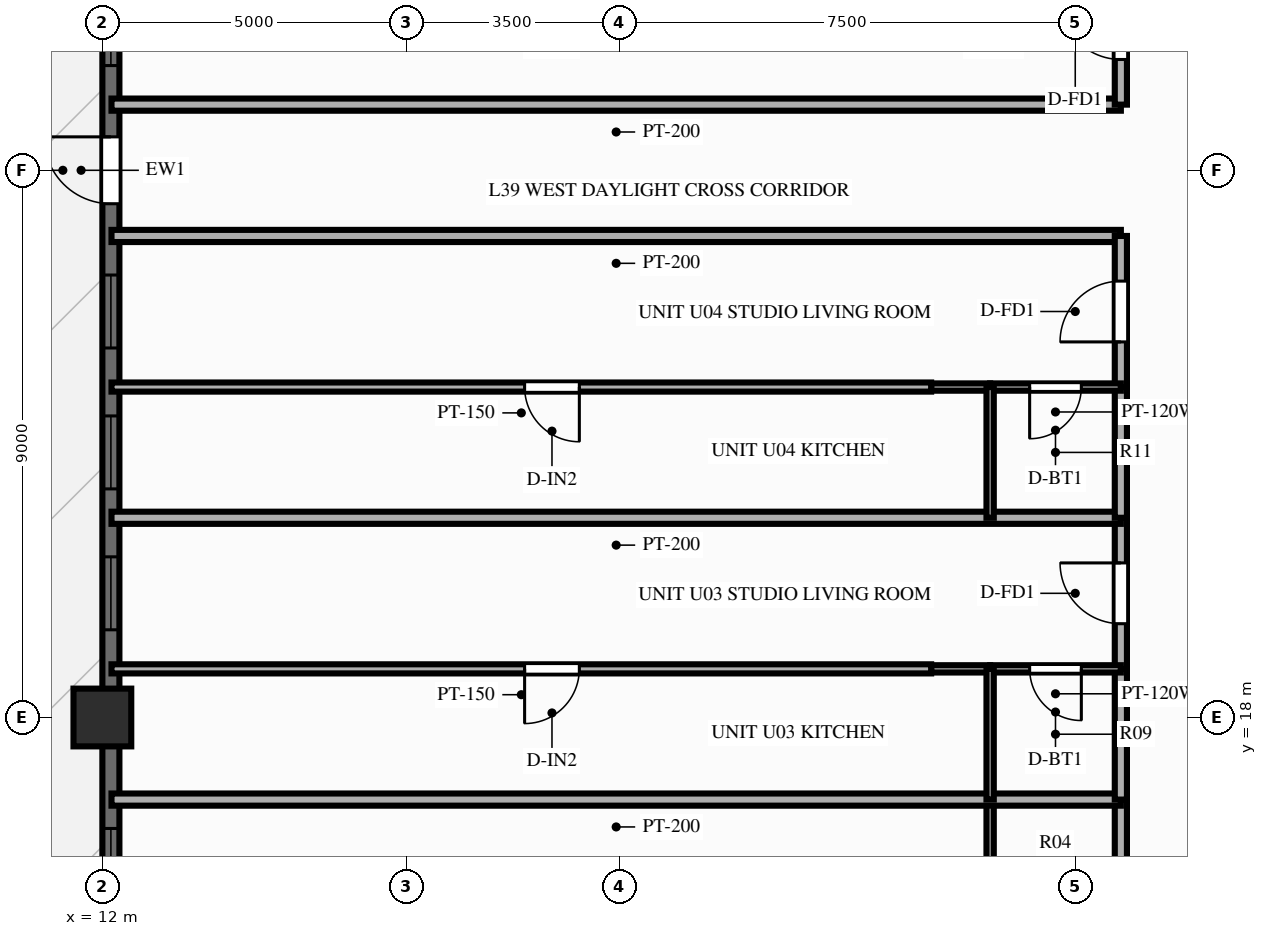
"""IFC4 building model, lengths in metres.
Left out: names, types, materials, properties, quantities, classifications, styles, units other than length and angle.
Written with IfcOpenShell. Run it as: python <this file> out.ifc"""

import sys

from ifc_helpers import new_model, si_unit, direction, frame, frame_2d, origin, origin_2d, place, context, subcontext, project, spatial, rectangle, extrude, source, transform, mapped, element, fill, save


model = new_model("IFC4")
c1 = context("Model", 3, precision=1e-05, world=origin(), true_north=direction((0.0, 1.0)))
c2 = subcontext(c1, "Body", "Model", "MODEL_VIEW")
j1 = project(units=[si_unit("LENGTHUNIT", "METRE"), si_unit("PLANEANGLEUNIT", "RADIAN")], contexts=[c1])
p1 = place(None, origin())
s1 = spatial("IfcSite", under=j1, at=p1, CompositionType="ELEMENT")
p2 = place(p1, origin())
s2 = spatial("IfcBuilding", under=s1, at=p2, CompositionType="ELEMENT")
p3 = place(p2, frame((0.0, 0.0, 122.85)))
s3 = spatial("IfcBuildingStorey", under=s2, at=p3, CompositionType="ELEMENT", Elevation=122.85)
m1 = source(origin(), c2, "Body", "SweptSolid", [
    extrude(rectangle(XDim=0.95, YDim=0.95, at=origin_2d()), origin(), (0.0, 0.0, 1.0), 3.9),
])
p4 = place(p3, frame((12.0, 18.0, 0.0), z_axis=(0.0, 0.0, 1.0), x_axis=(1.0, 0.0, 0.0)))
e1 = element("IfcColumn", 1, at=p4, inside=s3, PredefinedType="COLUMN", context=c2, shape_type="MappedRepresentation", body=[
    mapped(m1, transform((0.0, 0.0, 0.0), scale=1.0)),
])
p5 = place(p3, frame((12.14, 7.2, 0.0), z_axis=(0.0, 0.0, 1.0), x_axis=(0.0, 1.0, 0.0)))
e2 = element("IfcWall", 2, at=p5, inside=s3, PredefinedType="SOLIDWALL", context=c2, shape_type="SweptSolid", body=[
    extrude(rectangle(XDim=39.6, YDim=0.28, at=frame_2d((19.8, 0.0))), origin(), (0.0, 0.0, 1.0), 2.24),
])
p6 = place(p5, frame((0.89, 0.0, 0.25)))
e3 = element("IfcOpeningElement", 3, at=p6, cuts=e2, PredefinedType="OPENING", context=c2, shape_type="SweptSolid", body=[
    extrude(rectangle(XDim=1.2, YDim=1.5, at=frame_2d((0.6, 0.75))), frame((0.0, 0.152, 0.0), z_axis=(0.0, -1.0, 0.0), x_axis=(1.0, 0.0, 0.0)), (0.0, 0.0, 1.0), 0.304),
])
p7 = place(p5, frame((3.14, 0.0, 0.25)))
e4 = element("IfcOpeningElement", 4, at=p7, cuts=e2, PredefinedType="OPENING", context=c2, shape_type="SweptSolid", body=[
    extrude(rectangle(XDim=1.2, YDim=1.5, at=frame_2d((0.6, 0.75))), frame((0.0, 0.152, 0.0), z_axis=(0.0, -1.0, 0.0), x_axis=(1.0, 0.0, 0.0)), (0.0, 0.0, 1.0), 0.304),
])
p8 = place(p5, frame((5.458, 0.0, 0.25)))
e5 = element("IfcOpeningElement", 5, at=p8, cuts=e2, PredefinedType="OPENING", context=c2, shape_type="SweptSolid", body=[
    extrude(rectangle(XDim=1.2, YDim=1.5, at=frame_2d((0.6, 0.75))), frame((0.0, 0.152, 0.0), z_axis=(0.0, -1.0, 0.0), x_axis=(1.0, 0.0, 0.0)), (0.0, 0.0, 1.0), 0.304),
])
p9 = place(p5, frame((7.775, 0.0, 0.25)))
e6 = element("IfcOpeningElement", 6, at=p9, cuts=e2, PredefinedType="OPENING", context=c2, shape_type="SweptSolid", body=[
    extrude(rectangle(XDim=1.2, YDim=1.5, at=frame_2d((0.6, 0.75))), frame((0.0, 0.152, 0.0), z_axis=(0.0, -1.0, 0.0), x_axis=(1.0, 0.0, 0.0)), (0.0, 0.0, 1.0), 0.304),
])
p10 = place(p5, frame((12.242, 0.0, 0.25)))
e7 = element("IfcOpeningElement", 7, at=p10, cuts=e2, PredefinedType="OPENING", context=c2, shape_type="SweptSolid", body=[
    extrude(rectangle(XDim=1.2, YDim=1.5, at=frame_2d((0.6, 0.75))), frame((0.0, 0.152, 0.0), z_axis=(0.0, -1.0, 0.0), x_axis=(1.0, 0.0, 0.0)), (0.0, 0.0, 1.0), 0.304),
])
p11 = place(p5, frame((14.56, 0.0, 0.25)))
e8 = element("IfcOpeningElement", 8, at=p11, cuts=e2, PredefinedType="OPENING", context=c2, shape_type="SweptSolid", body=[
    extrude(rectangle(XDim=1.2, YDim=1.5, at=frame_2d((0.6, 0.75))), frame((0.0, 0.152, 0.0), z_axis=(0.0, -1.0, 0.0), x_axis=(1.0, 0.0, 0.0)), (0.0, 0.0, 1.0), 0.304),
])
p12 = place(p5, frame((16.877, 0.0, 0.25)))
e9 = element("IfcOpeningElement", 9, at=p12, cuts=e2, PredefinedType="OPENING", context=c2, shape_type="SweptSolid", body=[
    extrude(rectangle(XDim=1.2, YDim=1.5, at=frame_2d((0.6, 0.75))), frame((0.0, 0.152, 0.0), z_axis=(0.0, -1.0, 0.0), x_axis=(1.0, 0.0, 0.0)), (0.0, 0.0, 1.0), 0.304),
])
p13 = place(p5, frame((19.25, 0.0, 0.0)))
e10 = element("IfcOpeningElement", 10, at=p13, cuts=e2, PredefinedType="OPENING", context=c2, shape_type="SweptSolid", body=[
    extrude(rectangle(XDim=1.1, YDim=2.15, at=frame_2d((0.55, 1.075))), frame((0.0, 0.152, 0.0), z_axis=(0.0, -1.0, 0.0), x_axis=(1.0, 0.0, 0.0)), (0.0, 0.0, 1.0), 0.304),
])
p14 = place(p5, frame((21.522, 0.0, 0.25)))
e11 = element("IfcOpeningElement", 11, at=p14, cuts=e2, PredefinedType="OPENING", context=c2, shape_type="SweptSolid", body=[
    extrude(rectangle(XDim=1.2, YDim=1.5, at=frame_2d((0.6, 0.75))), frame((0.0, 0.152, 0.0), z_axis=(0.0, -1.0, 0.0), x_axis=(1.0, 0.0, 0.0)), (0.0, 0.0, 1.0), 0.304),
])
p15 = place(p5, frame((23.84, 0.0, 0.25)))
e12 = element("IfcOpeningElement", 12, at=p15, cuts=e2, PredefinedType="OPENING", context=c2, shape_type="SweptSolid", body=[
    extrude(rectangle(XDim=1.2, YDim=1.5, at=frame_2d((0.6, 0.75))), frame((0.0, 0.152, 0.0), z_axis=(0.0, -1.0, 0.0), x_axis=(1.0, 0.0, 0.0)), (0.0, 0.0, 1.0), 0.304),
])
p16 = place(p5, frame((26.157, 0.0, 0.25)))
e13 = element("IfcOpeningElement", 13, at=p16, cuts=e2, PredefinedType="OPENING", context=c2, shape_type="SweptSolid", body=[
    extrude(rectangle(XDim=1.2, YDim=1.5, at=frame_2d((0.6, 0.75))), frame((0.0, 0.152, 0.0), z_axis=(0.0, -1.0, 0.0), x_axis=(1.0, 0.0, 0.0)), (0.0, 0.0, 1.0), 0.304),
])
p17 = place(p5, frame((30.625, 0.0, 0.25)))
e14 = element("IfcOpeningElement", 14, at=p17, cuts=e2, PredefinedType="OPENING", context=c2, shape_type="SweptSolid", body=[
    extrude(rectangle(XDim=1.2, YDim=1.5, at=frame_2d((0.6, 0.75))), frame((0.0, 0.152, 0.0), z_axis=(0.0, -1.0, 0.0), x_axis=(1.0, 0.0, 0.0)), (0.0, 0.0, 1.0), 0.304),
])
p18 = place(p5, frame((32.942, 0.0, 0.25)))
e15 = element("IfcOpeningElement", 15, at=p18, cuts=e2, PredefinedType="OPENING", context=c2, shape_type="SweptSolid", body=[
    extrude(rectangle(XDim=1.2, YDim=1.5, at=frame_2d((0.6, 0.75))), frame((0.0, 0.152, 0.0), z_axis=(0.0, -1.0, 0.0), x_axis=(1.0, 0.0, 0.0)), (0.0, 0.0, 1.0), 0.304),
])
p19 = place(p5, frame((35.26, 0.0, 0.25)))
e16 = element("IfcOpeningElement", 16, at=p19, cuts=e2, PredefinedType="OPENING", context=c2, shape_type="SweptSolid", body=[
    extrude(rectangle(XDim=1.2, YDim=1.5, at=frame_2d((0.6, 0.75))), frame((0.0, 0.152, 0.0), z_axis=(0.0, -1.0, 0.0), x_axis=(1.0, 0.0, 0.0)), (0.0, 0.0, 1.0), 0.304),
])
p20 = place(p5, frame((37.51, 0.0, 0.25)))
e17 = element("IfcOpeningElement", 17, at=p20, cuts=e2, PredefinedType="OPENING", context=c2, shape_type="SweptSolid", body=[
    extrude(rectangle(XDim=1.2, YDim=1.5, at=frame_2d((0.6, 0.75))), frame((0.0, 0.152, 0.0), z_axis=(0.0, -1.0, 0.0), x_axis=(1.0, 0.0, 0.0)), (0.0, 0.0, 1.0), 0.304),
])
p21 = place(p3, frame((28.75, 25.92, 0.0), z_axis=(0.0, 0.0, 1.0), x_axis=(-1.0, 0.0, 0.0)))
e18 = element("IfcWall", 18, at=p21, inside=s3, PredefinedType="PARTITIONING", context=c2, shape_type="SweptSolid", body=[
    extrude(rectangle(XDim=16.6, YDim=0.2, at=frame_2d((8.3, 0.0))), origin(), (0.0, 0.0, 1.0), 3.56),
])
p22 = place(p3, frame((28.75, 14.5, 0.0), z_axis=(0.0, 0.0, 1.0), x_axis=(0.0, 1.0, 0.0)))
e19 = element("IfcWall", 19, at=p22, inside=s3, PredefinedType="PARTITIONING", context=c2, shape_type="SweptSolid", body=[
    extrude(rectangle(XDim=2.15, YDim=0.2, at=frame_2d((1.075, 0.0))), origin(), (0.0, 0.0, 1.0), 3.56),
])
p23 = place(p3, frame((26.6, 14.5, 0.0), z_axis=(0.0, 0.0, 1.0), x_axis=(0.0, 1.0, 0.0)))
e20 = element("IfcWall", 20, at=p23, inside=s3, PredefinedType="PARTITIONING", context=c2, shape_type="SweptSolid", body=[
    extrude(rectangle(XDim=2.15, YDim=0.12, at=frame_2d((1.075, 0.0))), origin(), (0.0, 0.0, 1.0), 3.56),
])
p24 = place(p3, frame((28.75, 16.65, 0.0), z_axis=(0.0, 0.0, 1.0), x_axis=(-1.0, 0.0, 0.0)))
e21 = element("IfcWall", 21, at=p24, inside=s3, PredefinedType="PARTITIONING", context=c2, shape_type="SweptSolid", body=[
    extrude(rectangle(XDim=16.6, YDim=0.2, at=frame_2d((8.3, 0.0))), origin(), (0.0, 0.0, 1.0), 3.56),
])
p25 = place(p3, frame((28.75, 16.65, 0.0), z_axis=(0.0, 0.0, 1.0), x_axis=(0.0, 1.0, 0.0)))
e22 = element("IfcWall", 22, at=p25, inside=s3, PredefinedType="PARTITIONING", context=c2, shape_type="SweptSolid", body=[
    extrude(rectangle(XDim=2.15, YDim=0.2, at=frame_2d((1.075, 0.0))), origin(), (0.0, 0.0, 1.0), 3.56),
])
p26 = place(p3, frame((28.75, 18.8, 0.0), z_axis=(0.0, 0.0, 1.0), x_axis=(0.0, 1.0, 0.0)))
e23 = element("IfcWall", 23, at=p26, inside=s3, PredefinedType="PARTITIONING", context=c2, shape_type="SweptSolid", body=[
    extrude(rectangle(XDim=2.485, YDim=0.2, at=frame_2d((1.242, 0.0))), origin(), (0.0, 0.0, 1.0), 3.56),
])
p27 = place(p26, frame((0.742, 0.0, 0.0)))
e24 = element("IfcOpeningElement", 24, at=p27, cuts=e23, PredefinedType="OPENING", context=c2, shape_type="SweptSolid", body=[
    extrude(rectangle(XDim=1.0, YDim=2.15, at=frame_2d((0.5, 1.075))), frame((0.0, 0.112, 0.0), z_axis=(0.0, -1.0, 0.0), x_axis=(1.0, 0.0, 0.0)), (0.0, 0.0, 1.0), 0.224),
])
p28 = place(p3, frame((28.75, 18.8, 0.0), z_axis=(0.0, 0.0, 1.0), x_axis=(-1.0, 0.0, 0.0)))
e25 = element("IfcWall", 25, at=p28, inside=s3, PredefinedType="PARTITIONING", context=c2, shape_type="SweptSolid", body=[
    extrude(rectangle(XDim=2.15, YDim=0.12, at=frame_2d((1.075, 0.0))), origin(), (0.0, 0.0, 1.0), 3.56),
])
p29 = place(p28, frame((0.65, 0.0, 0.0)))
e26 = element("IfcOpeningElement", 26, at=p29, cuts=e25, PredefinedType="OPENING", context=c2, shape_type="SweptSolid", body=[
    extrude(rectangle(XDim=0.85, YDim=2.05, at=frame_2d((0.425, 1.025))), frame((0.0, 0.072, 0.0), z_axis=(0.0, -1.0, 0.0), x_axis=(1.0, 0.0, 0.0)), (0.0, 0.0, 1.0), 0.144),
])
p30 = place(p3, frame((26.6, 18.8, 0.0), z_axis=(0.0, 0.0, 1.0), x_axis=(-1.0, 0.0, 0.0)))
e27 = element("IfcWall", 27, at=p30, inside=s3, PredefinedType="PARTITIONING", context=c2, shape_type="SweptSolid", body=[
    extrude(rectangle(XDim=0.97, YDim=0.12, at=frame_2d((0.485, 0.0))), origin(), (0.0, 0.0, 1.0), 3.56),
])
p31 = place(p3, frame((26.6, 16.65, 0.0), z_axis=(0.0, 0.0, 1.0), x_axis=(0.0, 1.0, 0.0)))
e28 = element("IfcWall", 28, at=p31, inside=s3, PredefinedType="PARTITIONING", context=c2, shape_type="SweptSolid", body=[
    extrude(rectangle(XDim=2.15, YDim=0.12, at=frame_2d((1.075, 0.0))), origin(), (0.0, 0.0, 1.0), 3.56),
])
p32 = place(p3, frame((25.63, 18.8, 0.0), z_axis=(0.0, 0.0, 1.0), x_axis=(-1.0, 0.0, 0.0)))
e29 = element("IfcWall", 29, at=p32, inside=s3, PredefinedType="PARTITIONING", context=c2, shape_type="SweptSolid", body=[
    extrude(rectangle(XDim=13.48, YDim=0.15, at=frame_2d((6.74, 0.0))), origin(), (0.0, 0.0, 1.0), 3.56),
])
p33 = place(p32, frame((5.786, 0.0, 0.0)))
e30 = element("IfcOpeningElement", 30, at=p33, cuts=e29, PredefinedType="OPENING", context=c2, shape_type="SweptSolid", body=[
    extrude(rectangle(XDim=0.9, YDim=2.1, at=frame_2d((0.45, 1.05))), frame((0.0, 0.087, 0.0), z_axis=(0.0, -1.0, 0.0), x_axis=(1.0, 0.0, 0.0)), (0.0, 0.0, 1.0), 0.174),
])
p34 = place(p3, frame((28.75, 21.285, 0.0), z_axis=(0.0, 0.0, 1.0), x_axis=(-1.0, 0.0, 0.0)))
e31 = element("IfcWall", 31, at=p34, inside=s3, PredefinedType="PARTITIONING", context=c2, shape_type="SweptSolid", body=[
    extrude(rectangle(XDim=16.6, YDim=0.2, at=frame_2d((8.3, 0.0))), origin(), (0.0, 0.0, 1.0), 3.56),
])
p35 = place(p3, frame((28.75, 21.285, 0.0), z_axis=(0.0, 0.0, 1.0), x_axis=(0.0, 1.0, 0.0)))
e32 = element("IfcWall", 32, at=p35, inside=s3, PredefinedType="PARTITIONING", context=c2, shape_type="SweptSolid", body=[
    extrude(rectangle(XDim=2.15, YDim=0.2, at=frame_2d((1.075, 0.0))), origin(), (0.0, 0.0, 1.0), 3.56),
])
p36 = place(p3, frame((28.75, 23.435, 0.0), z_axis=(0.0, 0.0, 1.0), x_axis=(0.0, 1.0, 0.0)))
e33 = element("IfcWall", 33, at=p36, inside=s3, PredefinedType="PARTITIONING", context=c2, shape_type="SweptSolid", body=[
    extrude(rectangle(XDim=2.485, YDim=0.2, at=frame_2d((1.242, 0.0))), origin(), (0.0, 0.0, 1.0), 3.56),
])
p37 = place(p36, frame((0.742, 0.0, 0.0)))
e34 = element("IfcOpeningElement", 34, at=p37, cuts=e33, PredefinedType="OPENING", context=c2, shape_type="SweptSolid", body=[
    extrude(rectangle(XDim=1.0, YDim=2.15, at=frame_2d((0.5, 1.075))), frame((0.0, 0.112, 0.0), z_axis=(0.0, -1.0, 0.0), x_axis=(1.0, 0.0, 0.0)), (0.0, 0.0, 1.0), 0.224),
])
p38 = place(p3, frame((28.75, 23.435, 0.0), z_axis=(0.0, 0.0, 1.0), x_axis=(-1.0, 0.0, 0.0)))
e35 = element("IfcWall", 35, at=p38, inside=s3, PredefinedType="PARTITIONING", context=c2, shape_type="SweptSolid", body=[
    extrude(rectangle(XDim=2.15, YDim=0.12, at=frame_2d((1.075, 0.0))), origin(), (0.0, 0.0, 1.0), 3.56),
])
p39 = place(p38, frame((0.65, 0.0, 0.0)))
e36 = element("IfcOpeningElement", 36, at=p39, cuts=e35, PredefinedType="OPENING", context=c2, shape_type="SweptSolid", body=[
    extrude(rectangle(XDim=0.85, YDim=2.05, at=frame_2d((0.425, 1.025))), frame((0.0, 0.072, 0.0), z_axis=(0.0, -1.0, 0.0), x_axis=(1.0, 0.0, 0.0)), (0.0, 0.0, 1.0), 0.144),
])
p40 = place(p3, frame((26.6, 23.435, 0.0), z_axis=(0.0, 0.0, 1.0), x_axis=(-1.0, 0.0, 0.0)))
e37 = element("IfcWall", 37, at=p40, inside=s3, PredefinedType="PARTITIONING", context=c2, shape_type="SweptSolid", body=[
    extrude(rectangle(XDim=0.97, YDim=0.12, at=frame_2d((0.485, 0.0))), origin(), (0.0, 0.0, 1.0), 3.56),
])
p41 = place(p3, frame((26.6, 21.285, 0.0), z_axis=(0.0, 0.0, 1.0), x_axis=(0.0, 1.0, 0.0)))
e38 = element("IfcWall", 38, at=p41, inside=s3, PredefinedType="PARTITIONING", context=c2, shape_type="SweptSolid", body=[
    extrude(rectangle(XDim=2.15, YDim=0.12, at=frame_2d((1.075, 0.0))), origin(), (0.0, 0.0, 1.0), 3.56),
])
p42 = place(p3, frame((25.63, 23.435, 0.0), z_axis=(0.0, 0.0, 1.0), x_axis=(-1.0, 0.0, 0.0)))
e39 = element("IfcWall", 39, at=p42, inside=s3, PredefinedType="PARTITIONING", context=c2, shape_type="SweptSolid", body=[
    extrude(rectangle(XDim=13.48, YDim=0.15, at=frame_2d((6.74, 0.0))), origin(), (0.0, 0.0, 1.0), 3.56),
])
p43 = place(p42, frame((5.786, 0.0, 0.0)))
e40 = element("IfcOpeningElement", 40, at=p43, cuts=e39, PredefinedType="OPENING", context=c2, shape_type="SweptSolid", body=[
    extrude(rectangle(XDim=0.9, YDim=2.1, at=frame_2d((0.45, 1.05))), frame((0.0, 0.087, 0.0), z_axis=(0.0, -1.0, 0.0), x_axis=(1.0, 0.0, 0.0)), (0.0, 0.0, 1.0), 0.174),
])
p44 = place(p3, frame((28.75, 28.08, 0.0), z_axis=(0.0, 0.0, 1.0), x_axis=(-1.0, 0.0, 0.0)))
e41 = element("IfcWall", 41, at=p44, inside=s3, PredefinedType="PARTITIONING", context=c2, shape_type="SweptSolid", body=[
    extrude(rectangle(XDim=16.6, YDim=0.2, at=frame_2d((8.3, 0.0))), origin(), (0.0, 0.0, 1.0), 3.56),
])
p45 = place(p3, frame((28.75, 28.08, 0.0), z_axis=(0.0, 0.0, 1.0), x_axis=(0.0, 1.0, 0.0)))
e42 = element("IfcWall", 42, at=p45, inside=s3, PredefinedType="PARTITIONING", context=c2, shape_type="SweptSolid", body=[
    extrude(rectangle(XDim=2.485, YDim=0.2, at=frame_2d((1.242, 0.0))), origin(), (0.0, 0.0, 1.0), 3.56),
])
p46 = place(p45, frame((0.742, 0.0, 0.0)))
e43 = element("IfcOpeningElement", 43, at=p46, cuts=e42, PredefinedType="OPENING", context=c2, shape_type="SweptSolid", body=[
    extrude(rectangle(XDim=1.0, YDim=2.15, at=frame_2d((0.5, 1.075))), frame((0.0, 0.112, 0.0), z_axis=(0.0, -1.0, 0.0), x_axis=(1.0, 0.0, 0.0)), (0.0, 0.0, 1.0), 0.224),
])
m2 = source(origin(), c2, "Body", "SweptSolid", [
    extrude(rectangle(XDim=1.2, YDim=1.5, at=frame_2d((0.6, 0.75))), frame((0.0, 0.03, 0.0), z_axis=(0.0, -1.0, 0.0), x_axis=(1.0, 0.0, 0.0)), (0.0, 0.0, 1.0), 0.06),
])
p47 = place(p9, origin())
e44 = element("IfcWindow", 44, at=p47, inside=s3, PartitioningType="SINGLE_PANEL", PredefinedType="WINDOW", context=c2, shape_type="MappedRepresentation", body=[
    mapped(m2, transform((0.0, 0.0, 0.0), scale=1.0)),
])
fill(e6, e44)
p48 = place(p10, origin())
e45 = element("IfcWindow", 45, at=p48, inside=s3, PartitioningType="SINGLE_PANEL", PredefinedType="WINDOW", context=c2, shape_type="MappedRepresentation", body=[
    mapped(m2, transform((0.0, 0.0, 0.0), scale=1.0)),
])
fill(e7, e45)
p49 = place(p11, origin())
e46 = element("IfcWindow", 46, at=p49, inside=s3, PartitioningType="SINGLE_PANEL", PredefinedType="WINDOW", context=c2, shape_type="MappedRepresentation", body=[
    mapped(m2, transform((0.0, 0.0, 0.0), scale=1.0)),
])
fill(e8, e46)
p50 = place(p12, origin())
e47 = element("IfcWindow", 47, at=p50, inside=s3, PartitioningType="SINGLE_PANEL", PredefinedType="WINDOW", context=c2, shape_type="MappedRepresentation", body=[
    mapped(m2, transform((0.0, 0.0, 0.0), scale=1.0)),
])
fill(e9, e47)
m3 = source(origin(), c2, "Body", "SweptSolid", [
    extrude(rectangle(XDim=1.1, YDim=2.15, at=frame_2d((0.55, 1.075))), frame((0.0, 0.025, 0.0), z_axis=(0.0, -1.0, 0.0), x_axis=(1.0, 0.0, 0.0)), (0.0, 0.0, 1.0), 0.05),
])
p51 = place(p13, origin())
e48 = element("IfcDoor", 48, at=p51, inside=s3, OperationType="SINGLE_SWING_RIGHT", PredefinedType="DOOR", context=c2, shape_type="MappedRepresentation", body=[
    mapped(m3, transform((0.0, 0.0, 0.0), scale=1.0)),
])
fill(e10, e48)
p52 = place(p14, origin())
e49 = element("IfcWindow", 49, at=p52, inside=s3, PartitioningType="SINGLE_PANEL", PredefinedType="WINDOW", context=c2, shape_type="MappedRepresentation", body=[
    mapped(m2, transform((0.0, 0.0, 0.0), scale=1.0)),
])
fill(e11, e49)
m4 = source(origin(), c2, "Body", "SweptSolid", [
    extrude(rectangle(XDim=1.0, YDim=2.15, at=frame_2d((0.5, 1.075))), frame((0.0, 0.025, 0.0), z_axis=(0.0, -1.0, 0.0), x_axis=(1.0, 0.0, 0.0)), (0.0, 0.0, 1.0), 0.05),
])
p53 = place(p27, origin())
e50 = element("IfcDoor", 50, at=p53, inside=s3, OperationType="SINGLE_SWING_RIGHT", PredefinedType="DOOR", context=c2, shape_type="MappedRepresentation", body=[
    mapped(m4, transform((0.0, 0.0, 0.0), scale=1.0)),
])
fill(e24, e50)
m5 = source(origin(), c2, "Body", "SweptSolid", [
    extrude(rectangle(XDim=0.85, YDim=2.05, at=frame_2d((0.425, 1.025))), frame((0.0, 0.025, 0.0), z_axis=(0.0, -1.0, 0.0), x_axis=(1.0, 0.0, 0.0)), (0.0, 0.0, 1.0), 0.05),
])
p54 = place(p29, origin())
e51 = element("IfcDoor", 51, at=p54, inside=s3, OperationType="SINGLE_SWING_LEFT", PredefinedType="DOOR", context=c2, shape_type="MappedRepresentation", body=[
    mapped(m5, transform((0.0, 0.0, 0.0), scale=1.0)),
])
fill(e26, e51)
m6 = source(origin(), c2, "Body", "SweptSolid", [
    extrude(rectangle(XDim=0.9, YDim=2.1, at=frame_2d((0.45, 1.05))), frame((0.0, 0.025, 0.0), z_axis=(0.0, -1.0, 0.0), x_axis=(1.0, 0.0, 0.0)), (0.0, 0.0, 1.0), 0.05),
])
p55 = place(p33, origin())
e52 = element("IfcDoor", 52, at=p55, inside=s3, OperationType="SINGLE_SWING_RIGHT", PredefinedType="DOOR", context=c2, shape_type="MappedRepresentation", body=[
    mapped(m6, transform((0.0, 0.0, 0.0), scale=1.0)),
])
fill(e30, e52)
p56 = place(p37, origin())
e53 = element("IfcDoor", 53, at=p56, inside=s3, OperationType="SINGLE_SWING_LEFT", PredefinedType="DOOR", context=c2, shape_type="MappedRepresentation", body=[
    mapped(m4, transform((0.0, 0.0, 0.0), scale=1.0)),
])
fill(e34, e53)
p57 = place(p39, origin())
e54 = element("IfcDoor", 54, at=p57, inside=s3, OperationType="SINGLE_SWING_RIGHT", PredefinedType="DOOR", context=c2, shape_type="MappedRepresentation", body=[
    mapped(m5, transform((0.0, 0.0, 0.0), scale=1.0)),
])
fill(e36, e54)
p58 = place(p43, origin())
e55 = element("IfcDoor", 55, at=p58, inside=s3, OperationType="SINGLE_SWING_LEFT", PredefinedType="DOOR", context=c2, shape_type="MappedRepresentation", body=[
    mapped(m6, transform((0.0, 0.0, 0.0), scale=1.0)),
])
fill(e40, e55)
p59 = place(p46, origin())
e56 = element("IfcDoor", 56, at=p59, inside=s3, OperationType="SINGLE_SWING_RIGHT", PredefinedType="DOOR", context=c2, shape_type="MappedRepresentation", body=[
    mapped(m4, transform((0.0, 0.0, 0.0), scale=1.0)),
])
fill(e43, e56)
save(model, sys.argv[1])
